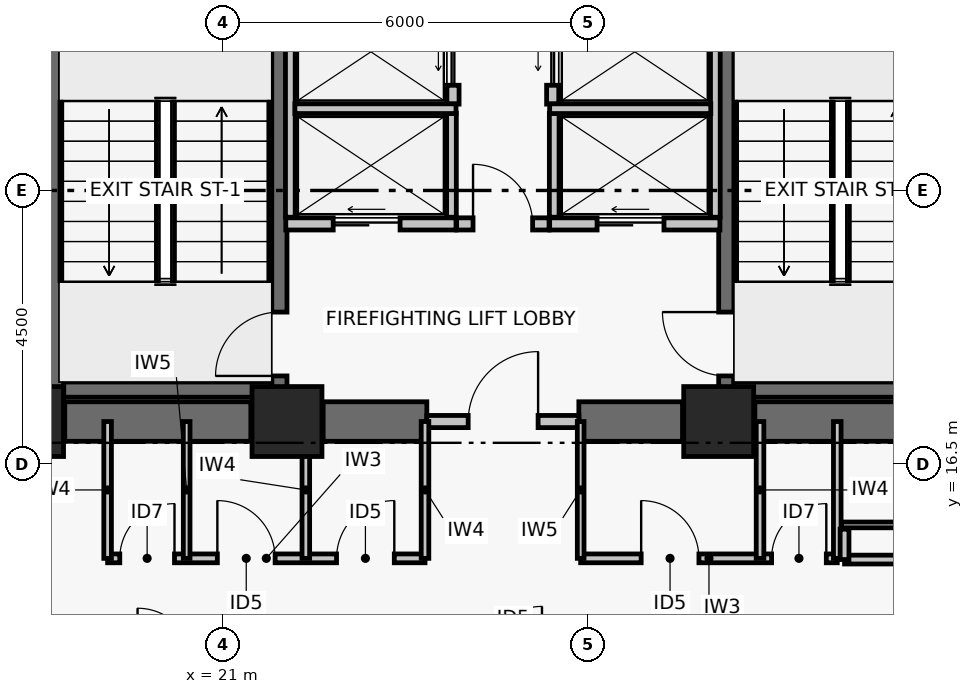
"""IFC4 building model, lengths in metres.
Left out: names, types, materials, properties, quantities, classifications, styles, units other than length and angle.
Written with IfcOpenShell. Run it as: python <this file> out.ifc"""

import sys

from ifc_helpers import new_model, si_unit, direction, frame, frame_2d, origin, origin_2d, place, context, subcontext, project, spatial, rectangle, extrude, element, fill, save


model = new_model("IFC4")
c1 = context("Model", 3, precision=1e-05, world=origin(), true_north=direction((0.0, 1.0)))
c2 = subcontext(c1, "Body", "Model", "MODEL_VIEW")
j1 = project(units=[si_unit("LENGTHUNIT", "METRE"), si_unit("PLANEANGLEUNIT", "RADIAN")], contexts=[c1])
p1 = place(None, origin())
s1 = spatial("IfcSite", under=j1, at=p1, CompositionType="ELEMENT")
p2 = place(p1, origin())
s2 = spatial("IfcBuilding", under=s1, at=p2, CompositionType="ELEMENT")
p3 = place(p2, frame((0.0, 0.0, 12.0)))
s3 = spatial("IfcBuildingStorey", under=s2, at=p3, CompositionType="ELEMENT", Elevation=12.0)
for number, where, z_axis, x_axis in (
    (1, (17.8, 17.2, 0.0), (0.0, 0.0, 1.0), (1.0, 0.0, 0.0)),
    (2, (22.05, 17.2, 0.0), (0.0, 0.0, 1.0), (1.0, 0.0, 0.0)),
    (3, (29.15, 17.2, 0.0), (0.0, 0.0, 1.0), (1.0, 0.0, 0.0)),
):
    element("IfcColumn", number, at=place(p3, frame(where, z_axis=z_axis, x_axis=x_axis)), inside=s3, PredefinedType="COLUMN", context=c2, shape_type="SweptSolid", body=[
        extrude(rectangle(XDim=1.15, YDim=1.15, at=origin_2d()), origin(), (0.0, 0.0, 1.0), 6.0),
    ])
p4 = place(p3, frame((18.395, 17.2, 0.0), z_axis=(0.0, 0.0, 1.0), x_axis=(1.0, 0.0, 0.0)))
e4 = element("IfcWall", 4, at=p4, inside=s3, PredefinedType="SHEAR", context=c2, shape_type="SweptSolid", body=[
    extrude(rectangle(XDim=3.06, YDim=0.65, at=frame_2d((1.53, 0.0))), origin(), (0.0, 0.0, 1.0), 5.68),
])
p5 = place(p3, frame((22.645, 17.2, 0.0), z_axis=(0.0, 0.0, 1.0), x_axis=(1.0, 0.0, 0.0)))
e5 = element("IfcWall", 5, at=p5, inside=s3, PredefinedType="SHEAR", context=c2, shape_type="SweptSolid", body=[
    extrude(rectangle(XDim=1.705, YDim=0.65, at=frame_2d((0.853, 0.0))), origin(), (0.0, 0.0, 1.0), 5.68),
])
p6 = place(p3, frame((26.85, 17.2, 0.0), z_axis=(0.0, 0.0, 1.0), x_axis=(1.0, 0.0, 0.0)))
e6 = element("IfcWall", 6, at=p6, inside=s3, PredefinedType="SHEAR", context=c2, shape_type="SweptSolid", body=[
    extrude(rectangle(XDim=1.705, YDim=0.65, at=frame_2d((0.853, 0.0))), origin(), (0.0, 0.0, 1.0), 5.68),
])
p7 = place(p3, frame((29.745, 17.2, 0.0), z_axis=(0.0, 0.0, 1.0), x_axis=(1.0, 0.0, 0.0)))
e7 = element("IfcWall", 7, at=p7, inside=s3, PredefinedType="SHEAR", context=c2, shape_type="SweptSolid", body=[
    extrude(rectangle(XDim=3.06, YDim=0.65, at=frame_2d((1.53, 0.0))), origin(), (0.0, 0.0, 1.0), 5.68),
])
p8 = place(p3, frame((18.254, 17.6, 0.0), z_axis=(0.0, 0.0, 1.0), x_axis=(0.0, 1.0, 0.0)))
e8 = element("IfcWall", 8, at=p8, inside=s3, PredefinedType="SHEAR", context=c2, shape_type="SweptSolid", body=[
    extrude(rectangle(XDim=8.8, YDim=0.25, at=frame_2d((4.4, 0.0))), origin(), (0.0, 0.0, 1.0), 5.68),
])
p9 = place(p3, frame((21.925, 17.6, 0.0), z_axis=(0.0, 0.0, 1.0), x_axis=(0.0, 1.0, 0.0)))
e9 = element("IfcWall", 9, at=p9, inside=s3, PredefinedType="SHEAR", context=c2, shape_type="SweptSolid", body=[
    extrude(rectangle(XDim=8.8, YDim=0.25, at=frame_2d((4.4, 0.0))), origin(), (0.0, 0.0, 1.0), 5.68),
])
p10 = place(p9, frame((0.35, 0.0, 0.0)))
e10 = element("IfcOpeningElement", 10, at=p10, cuts=e9, PredefinedType="OPENING", context=c2, shape_type="SweptSolid", body=[
    extrude(rectangle(XDim=1.05, YDim=2.08, at=frame_2d((0.525, 1.04))), frame((0.0, 0.135, 0.0), z_axis=(0.0, -1.0, 0.0), x_axis=(1.0, 0.0, 0.0)), (0.0, 0.0, 1.0), 0.27),
])
p11 = place(p3, frame((18.379, 17.725, 0.0), z_axis=(0.0, 0.0, 1.0), x_axis=(1.0, 0.0, 0.0)))
e11 = element("IfcWall", 11, at=p11, inside=s3, PredefinedType="SHEAR", context=c2, shape_type="SweptSolid", body=[
    extrude(rectangle(XDim=3.421, YDim=0.25, at=frame_2d((1.71, 0.0))), origin(), (0.0, 0.0, 1.0), 5.68),
])
p12 = place(p3, frame((29.275, 17.6, 0.0), z_axis=(0.0, 0.0, 1.0), x_axis=(0.0, 1.0, 0.0)))
e12 = element("IfcWall", 12, at=p12, inside=s3, PredefinedType="SHEAR", context=c2, shape_type="SweptSolid", body=[
    extrude(rectangle(XDim=8.8, YDim=0.25, at=frame_2d((4.4, 0.0))), origin(), (0.0, 0.0, 1.0), 5.68),
])
p13 = place(p12, frame((0.35, 0.0, 0.0)))
e13 = element("IfcOpeningElement", 13, at=p13, cuts=e12, PredefinedType="OPENING", context=c2, shape_type="SweptSolid", body=[
    extrude(rectangle(XDim=1.05, YDim=2.08, at=frame_2d((0.525, 1.04))), frame((0.0, 0.135, 0.0), z_axis=(0.0, -1.0, 0.0), x_axis=(1.0, 0.0, 0.0)), (0.0, 0.0, 1.0), 0.27),
])
p14 = place(p3, frame((29.4, 17.725, 0.0), z_axis=(0.0, 0.0, 1.0), x_axis=(1.0, 0.0, 0.0)))
e14 = element("IfcWall", 14, at=p14, inside=s3, PredefinedType="SHEAR", context=c2, shape_type="SweptSolid", body=[
    extrude(rectangle(XDim=3.421, YDim=0.25, at=frame_2d((1.71, 0.0))), origin(), (0.0, 0.0, 1.0), 5.68),
])
p15 = place(p3, frame((24.35, 17.2, 0.0), z_axis=(0.0, 0.0, 1.0), x_axis=(1.0, 0.0, 0.0)))
e15 = element("IfcWall", 15, at=p15, inside=s3, PredefinedType="PARTITIONING", context=c2, shape_type="SweptSolid", body=[
    extrude(rectangle(XDim=2.5, YDim=0.2, at=frame_2d((1.25, 0.0))), origin(), (0.0, 0.0, 1.0), 4.81),
])
p16 = place(p15, frame((0.68, 0.0, 0.0)))
e16 = element("IfcOpeningElement", 16, at=p16, cuts=e15, PredefinedType="OPENING", context=c2, shape_type="SweptSolid", body=[
    extrude(rectangle(XDim=1.15, YDim=2.08, at=frame_2d((0.575, 1.04))), frame((0.0, 0.11, 0.0), z_axis=(0.0, -1.0, 0.0), x_axis=(1.0, 0.0, 0.0)), (0.0, 0.0, 1.0), 0.22),
])
p17 = place(p3, frame((24.84, 20.45, 0.0), z_axis=(0.0, 0.0, 1.0), x_axis=(1.0, 0.0, 0.0)))
e17 = element("IfcWall", 17, at=p17, inside=s3, PredefinedType="PARTITIONING", context=c2, shape_type="SweptSolid", body=[
    extrude(rectangle(XDim=1.52, YDim=0.2, at=frame_2d((0.76, 0.0))), origin(), (0.0, 0.0, 1.0), 5.68),
])
p18 = place(p17, frame((0.27, 0.0, 0.0)))
e18 = element("IfcOpeningElement", 18, at=p18, cuts=e17, PredefinedType="OPENING", context=c2, shape_type="SweptSolid", body=[
    extrude(rectangle(XDim=0.98, YDim=2.06, at=frame_2d((0.49, 1.03))), frame((0.0, 0.11, 0.0), z_axis=(0.0, -1.0, 0.0), x_axis=(1.0, 0.0, 0.0)), (0.0, 0.0, 1.0), 0.22),
])
p19 = place(p3, frame((22.03, 20.45, 0.0), z_axis=(0.0, 0.0, 1.0), x_axis=(1.0, 0.0, 0.0)))
e19 = element("IfcWall", 19, at=p19, inside=s3, PredefinedType="PARTITIONING", context=c2, shape_type="SweptSolid", body=[
    extrude(rectangle(XDim=2.8, YDim=0.2, at=frame_2d((1.4, 0.0))), origin(), (0.0, 0.0, 1.0), 5.68),
])
p20 = place(p19, frame((0.78, 0.0, 0.0)))
e20 = element("IfcOpeningElement", 20, at=p20, cuts=e19, PredefinedType="OPENING", context=c2, shape_type="SweptSolid", body=[
    extrude(rectangle(XDim=1.1, YDim=2.08, at=frame_2d((0.55, 1.04))), frame((0.0, 0.11, 0.0), z_axis=(0.0, -1.0, 0.0), x_axis=(1.0, 0.0, 0.0)), (0.0, 0.0, 1.0), 0.22),
])
p21 = place(p3, frame((26.37, 20.45, 0.0), z_axis=(0.0, 0.0, 1.0), x_axis=(1.0, 0.0, 0.0)))
e21 = element("IfcWall", 21, at=p21, inside=s3, PredefinedType="PARTITIONING", context=c2, shape_type="SweptSolid", body=[
    extrude(rectangle(XDim=2.8, YDim=0.2, at=frame_2d((1.4, 0.0))), origin(), (0.0, 0.0, 1.0), 5.68),
])
p22 = place(p21, frame((0.78, 0.0, 0.0)))
e22 = element("IfcOpeningElement", 22, at=p22, cuts=e21, PredefinedType="OPENING", context=c2, shape_type="SweptSolid", body=[
    extrude(rectangle(XDim=1.1, YDim=2.08, at=frame_2d((0.55, 1.04))), frame((0.0, 0.11, 0.0), z_axis=(0.0, -1.0, 0.0), x_axis=(1.0, 0.0, 0.0)), (0.0, 0.0, 1.0), 0.22),
])
p23 = place(p3, frame((24.78, 22.42, 0.0), z_axis=(0.0, 0.0, 1.0), x_axis=(0.0, 1.0, 0.0)))
e23 = element("IfcWall", 23, at=p23, inside=s3, PredefinedType="PARTITIONING", context=c2, shape_type="SweptSolid", body=[
    extrude(rectangle(XDim=1.72, YDim=0.2, at=frame_2d((0.86, 0.0))), origin(), (0.0, 0.0, 1.0), 5.68),
])
p24 = place(p23, frame((0.31, 0.0, 0.0)))
e24 = element("IfcOpeningElement", 24, at=p24, cuts=e23, PredefinedType="OPENING", context=c2, shape_type="SweptSolid", body=[
    extrude(rectangle(XDim=1.1, YDim=2.08, at=frame_2d((0.55, 1.04))), frame((0.0, 0.11, 0.0), z_axis=(0.0, -1.0, 0.0), x_axis=(1.0, 0.0, 0.0)), (0.0, 0.0, 1.0), 0.22),
])
p25 = place(p3, frame((26.42, 22.42, 0.0), z_axis=(0.0, 0.0, 1.0), x_axis=(0.0, 1.0, 0.0)))
e25 = element("IfcWall", 25, at=p25, inside=s3, PredefinedType="PARTITIONING", context=c2, shape_type="SweptSolid", body=[
    extrude(rectangle(XDim=1.72, YDim=0.2, at=frame_2d((0.86, 0.0))), origin(), (0.0, 0.0, 1.0), 5.68),
])
p26 = place(p25, frame((0.31, 0.0, 0.0)))
e26 = element("IfcOpeningElement", 26, at=p26, cuts=e25, PredefinedType="OPENING", context=c2, shape_type="SweptSolid", body=[
    extrude(rectangle(XDim=1.1, YDim=2.08, at=frame_2d((0.55, 1.04))), frame((0.0, 0.11, 0.0), z_axis=(0.0, -1.0, 0.0), x_axis=(1.0, 0.0, 0.0)), (0.0, 0.0, 1.0), 0.22),
])
p27 = place(p3, frame((22.105, 20.56, 0.0), z_axis=(0.0, 0.0, 1.0), x_axis=(0.0, 1.0, 0.0)))
e27 = element("IfcWall", 27, at=p27, inside=s3, PredefinedType="PARTITIONING", context=c2, shape_type="SweptSolid", body=[
    extrude(rectangle(XDim=5.45, YDim=0.16, at=frame_2d((2.725, 0.0))), origin(), (0.0, 0.0, 1.0), 5.68),
])
p28 = place(p3, frame((24.755, 20.56, 0.0), z_axis=(0.0, 0.0, 1.0), x_axis=(0.0, 1.0, 0.0)))
e28 = element("IfcWall", 28, at=p28, inside=s3, PredefinedType="PARTITIONING", context=c2, shape_type="SweptSolid", body=[
    extrude(rectangle(XDim=1.71, YDim=0.16, at=frame_2d((0.855, 0.0))), origin(), (0.0, 0.0, 1.0), 5.68),
])
p29 = place(p3, frame((22.18, 22.345, 0.0), z_axis=(0.0, 0.0, 1.0), x_axis=(1.0, 0.0, 0.0)))
e29 = element("IfcWall", 29, at=p29, inside=s3, PredefinedType="PARTITIONING", context=c2, shape_type="SweptSolid", body=[
    extrude(rectangle(XDim=2.65, YDim=0.16, at=frame_2d((1.325, 0.0))), origin(), (0.0, 0.0, 1.0), 5.68),
])
p30 = place(p3, frame((29.095, 20.56, 0.0), z_axis=(0.0, 0.0, 1.0), x_axis=(0.0, 1.0, 0.0)))
e30 = element("IfcWall", 30, at=p30, inside=s3, PredefinedType="PARTITIONING", context=c2, shape_type="SweptSolid", body=[
    extrude(rectangle(XDim=5.45, YDim=0.16, at=frame_2d((2.725, 0.0))), origin(), (0.0, 0.0, 1.0), 5.68),
])
p31 = place(p3, frame((26.445, 20.56, 0.0), z_axis=(0.0, 0.0, 1.0), x_axis=(0.0, 1.0, 0.0)))
e31 = element("IfcWall", 31, at=p31, inside=s3, PredefinedType="PARTITIONING", context=c2, shape_type="SweptSolid", body=[
    extrude(rectangle(XDim=1.71, YDim=0.16, at=frame_2d((0.855, 0.0))), origin(), (0.0, 0.0, 1.0), 5.68),
])
p32 = place(p3, frame((26.37, 22.345, 0.0), z_axis=(0.0, 0.0, 1.0), x_axis=(1.0, 0.0, 0.0)))
e32 = element("IfcWall", 32, at=p32, inside=s3, PredefinedType="PARTITIONING", context=c2, shape_type="SweptSolid", body=[
    extrude(rectangle(XDim=2.65, YDim=0.16, at=frame_2d((1.325, 0.0))), origin(), (0.0, 0.0, 1.0), 5.68),
])
p33 = place(p3, frame((19.1, 14.95, 0.0), z_axis=(0.0, 0.0, 1.0), x_axis=(1.0, 0.0, 0.0)))
e33 = element("IfcWall", 33, at=p33, inside=s3, PredefinedType="PARTITIONING", context=c2, shape_type="SweptSolid", body=[
    extrude(rectangle(XDim=5.22, YDim=0.145, at=frame_2d((2.61, 0.0))), origin(), (0.0, 0.0, 1.0), 4.76),
])
p34 = place(p33, frame((0.2, 0.0, 0.0)))
e34 = element("IfcOpeningElement", 34, at=p34, cuts=e33, PredefinedType="OPENING", context=c2, shape_type="SweptSolid", body=[
    extrude(rectangle(XDim=0.9, YDim=2.02, at=frame_2d((0.45, 1.01))), frame((0.0, 0.083, 0.0), z_axis=(0.0, -1.0, 0.0), x_axis=(1.0, 0.0, 0.0)), (0.0, 0.0, 1.0), 0.165),
])
p35 = place(p33, frame((1.805, 0.0, 0.0)))
e35 = element("IfcOpeningElement", 35, at=p35, cuts=e33, PredefinedType="OPENING", context=c2, shape_type="SweptSolid", body=[
    extrude(rectangle(XDim=0.95, YDim=2.06, at=frame_2d((0.475, 1.03))), frame((0.0, 0.083, 0.0), z_axis=(0.0, -1.0, 0.0), x_axis=(1.0, 0.0, 0.0)), (0.0, 0.0, 1.0), 0.165),
])
p36 = place(p33, frame((3.765, 0.0, 0.0)))
e36 = element("IfcOpeningElement", 36, at=p36, cuts=e33, PredefinedType="OPENING", context=c2, shape_type="SweptSolid", body=[
    extrude(rectangle(XDim=0.95, YDim=2.06, at=frame_2d((0.475, 1.03))), frame((0.0, 0.083, 0.0), z_axis=(0.0, -1.0, 0.0), x_axis=(1.0, 0.0, 0.0)), (0.0, 0.0, 1.0), 0.165),
])
p37 = place(p3, frame((26.88, 14.95, 0.0), z_axis=(0.0, 0.0, 1.0), x_axis=(1.0, 0.0, 0.0)))
e37 = element("IfcWall", 37, at=p37, inside=s3, PredefinedType="PARTITIONING", context=c2, shape_type="SweptSolid", body=[
    extrude(rectangle(XDim=4.22, YDim=0.145, at=frame_2d((2.11, 0.0))), origin(), (0.0, 0.0, 1.0), 5.21),
])
p38 = place(p37, frame((0.995, 0.0, 0.0)))
e38 = element("IfcOpeningElement", 38, at=p38, cuts=e37, PredefinedType="OPENING", context=c2, shape_type="SweptSolid", body=[
    extrude(rectangle(XDim=0.95, YDim=2.06, at=frame_2d((0.475, 1.03))), frame((0.0, 0.083, 0.0), z_axis=(0.0, -1.0, 0.0), x_axis=(1.0, 0.0, 0.0)), (0.0, 0.0, 1.0), 0.165),
])
p39 = place(p37, frame((3.14, 0.0, 0.0)))
e39 = element("IfcOpeningElement", 39, at=p39, cuts=e37, PredefinedType="OPENING", context=c2, shape_type="SweptSolid", body=[
    extrude(rectangle(XDim=0.9, YDim=2.02, at=frame_2d((0.45, 1.01))), frame((0.0, 0.083, 0.0), z_axis=(0.0, -1.0, 0.0), x_axis=(1.0, 0.0, 0.0)), (0.0, 0.0, 1.0), 0.165),
])
p40 = place(p3, frame((19.1, 14.95, 0.0), z_axis=(0.0, 0.0, 1.0), x_axis=(0.0, 1.0, 0.0)))
e40 = element("IfcWall", 40, at=p40, inside=s3, PredefinedType="PARTITIONING", context=c2, shape_type="SweptSolid", body=[
    extrude(rectangle(XDim=2.25, YDim=0.125, at=frame_2d((1.125, 0.0))), origin(), (0.0, 0.0, 1.0), 4.81),
])
p41 = place(p3, frame((20.4, 14.95, 0.0), z_axis=(0.0, 0.0, 1.0), x_axis=(0.0, 1.0, 0.0)))
e41 = element("IfcWall", 41, at=p41, inside=s3, PredefinedType="PARTITIONING", context=c2, shape_type="SweptSolid", body=[
    extrude(rectangle(XDim=2.25, YDim=0.11, at=frame_2d((1.125, 0.0))), origin(), (0.0, 0.0, 1.0), 4.81),
])
p42 = place(p3, frame((22.36, 14.95, 0.0), z_axis=(0.0, 0.0, 1.0), x_axis=(0.0, 1.0, 0.0)))
e42 = element("IfcWall", 42, at=p42, inside=s3, PredefinedType="PARTITIONING", context=c2, shape_type="SweptSolid", body=[
    extrude(rectangle(XDim=2.25, YDim=0.125, at=frame_2d((1.125, 0.0))), origin(), (0.0, 0.0, 1.0), 4.76),
])
p43 = place(p3, frame((24.32, 14.95, 0.0), z_axis=(0.0, 0.0, 1.0), x_axis=(0.0, 1.0, 0.0)))
e43 = element("IfcWall", 43, at=p43, inside=s3, PredefinedType="PARTITIONING", context=c2, shape_type="SweptSolid", body=[
    extrude(rectangle(XDim=2.25, YDim=0.125, at=frame_2d((1.125, 0.0))), origin(), (0.0, 0.0, 1.0), 4.81),
])
p44 = place(p3, frame((26.88, 14.95, 0.0), z_axis=(0.0, 0.0, 1.0), x_axis=(0.0, 1.0, 0.0)))
e44 = element("IfcWall", 44, at=p44, inside=s3, PredefinedType="PARTITIONING", context=c2, shape_type="SweptSolid", body=[
    extrude(rectangle(XDim=2.25, YDim=0.11, at=frame_2d((1.125, 0.0))), origin(), (0.0, 0.0, 1.0), 4.81),
])
for number, where, z_axis, x_axis in (
    (45, (29.83, 14.95, 0.0), (0.0, 0.0, 1.0), (0.0, 1.0, 0.0)),
    (46, (31.1, 14.95, 0.0), (0.0, 0.0, 1.0), (0.0, 1.0, 0.0)),
):
    element("IfcWall", number, at=place(p3, frame(where, z_axis=z_axis, x_axis=x_axis)), inside=s3, PredefinedType="PARTITIONING", context=c2, shape_type="SweptSolid", body=[
        extrude(rectangle(XDim=2.25, YDim=0.125, at=frame_2d((1.125, 0.0))), origin(), (0.0, 0.0, 1.0), 4.81),
    ])
p45 = place(p3, frame((32.8, 14.93, 0.0), z_axis=(0.0, 0.0, 1.0), x_axis=(-1.0, 0.0, 0.0)))
e47 = element("IfcWall", 47, at=p45, inside=s3, PredefinedType="PARTITIONING", context=c2, shape_type="SweptSolid", body=[
    extrude(rectangle(XDim=1.58, YDim=0.145, at=frame_2d((0.79, 0.0))), origin(), (0.0, 0.0, 1.0), 5.21),
])
p46 = place(p3, frame((31.22, 14.93, 0.0), z_axis=(0.0, 0.0, 1.0), x_axis=(0.0, 1.0, 0.0)))
e48 = element("IfcWall", 48, at=p46, inside=s3, PredefinedType="PARTITIONING", context=c2, shape_type="SweptSolid", body=[
    extrude(rectangle(XDim=0.5, YDim=0.145, at=frame_2d((0.25, 0.0))), origin(), (0.0, 0.0, 1.0), 5.21),
])
p47 = place(p3, frame((31.17, 15.5, 0.0), z_axis=(0.0, 0.0, 1.0), x_axis=(1.0, 0.0, 0.0)))
e49 = element("IfcWall", 49, at=p47, inside=s3, PredefinedType="PARTITIONING", context=c2, shape_type="SweptSolid", body=[
    extrude(rectangle(XDim=8.689, YDim=0.095, at=frame_2d((4.345, 0.0))), origin(), (0.0, 0.0, 1.0), 4.76),
])
p48 = place(p47, frame((2.983, 0.0, 0.0)))
e50 = element("IfcOpeningElement", 50, at=p48, cuts=e49, PredefinedType="OPENING", context=c2, shape_type="SweptSolid", body=[
    extrude(rectangle(XDim=0.92, YDim=2.05, at=frame_2d((0.46, 1.025))), frame((0.0, 0.057, 0.0), z_axis=(0.0, -1.0, 0.0), x_axis=(1.0, 0.0, 0.0)), (0.0, 0.0, 1.0), 0.115),
])
p49 = place(p10, origin())
e51 = element("IfcDoor", 51, at=p49, inside=s3, OperationType="SINGLE_SWING_LEFT", PredefinedType="DOOR", context=c2, shape_type="SweptSolid", body=[
    extrude(rectangle(XDim=1.05, YDim=2.08, at=frame_2d((0.525, 1.04))), frame((0.0, 0.025, 0.0), z_axis=(0.0, -1.0, 0.0), x_axis=(1.0, 0.0, 0.0)), (0.0, 0.0, 1.0), 0.05),
])
fill(e10, e51)
p50 = place(p13, origin())
e52 = element("IfcDoor", 52, at=p50, inside=s3, OperationType="SINGLE_SWING_RIGHT", PredefinedType="DOOR", context=c2, shape_type="SweptSolid", body=[
    extrude(rectangle(XDim=1.05, YDim=2.08, at=frame_2d((0.525, 1.04))), frame((0.0, 0.025, 0.0), z_axis=(0.0, -1.0, 0.0), x_axis=(1.0, 0.0, 0.0)), (0.0, 0.0, 1.0), 0.05),
])
fill(e13, e52)
p51 = place(p16, origin())
e53 = element("IfcDoor", 53, at=p51, inside=s3, OperationType="SINGLE_SWING_RIGHT", PredefinedType="DOOR", context=c2, shape_type="SweptSolid", body=[
    extrude(rectangle(XDim=1.15, YDim=2.08, at=frame_2d((0.575, 1.04))), frame((0.0, 0.025, 0.0), z_axis=(0.0, -1.0, 0.0), x_axis=(1.0, 0.0, 0.0)), (0.0, 0.0, 1.0), 0.05),
])
fill(e16, e53)
p52 = place(p18, origin())
e54 = element("IfcDoor", 54, at=p52, inside=s3, OperationType="SINGLE_SWING_LEFT", PredefinedType="DOOR", context=c2, shape_type="SweptSolid", body=[
    extrude(rectangle(XDim=0.98, YDim=2.06, at=frame_2d((0.49, 1.03))), frame((0.0, 0.025, 0.0), z_axis=(0.0, -1.0, 0.0), x_axis=(1.0, 0.0, 0.0)), (0.0, 0.0, 1.0), 0.05),
])
fill(e18, e54)
p53 = place(p20, origin())
e55 = element("IfcDoor", 55, at=p53, inside=s3, OperationType="DOUBLE_DOOR_SLIDING", PredefinedType="DOOR", context=c2, shape_type="SweptSolid", body=[
    extrude(rectangle(XDim=1.1, YDim=2.08, at=frame_2d((0.55, 1.04))), frame((0.0, 0.025, 0.0), z_axis=(0.0, -1.0, 0.0), x_axis=(1.0, 0.0, 0.0)), (0.0, 0.0, 1.0), 0.05),
])
fill(e20, e55)
p54 = place(p22, origin())
e56 = element("IfcDoor", 56, at=p54, inside=s3, OperationType="DOUBLE_DOOR_SLIDING", PredefinedType="DOOR", context=c2, shape_type="SweptSolid", body=[
    extrude(rectangle(XDim=1.1, YDim=2.08, at=frame_2d((0.55, 1.04))), frame((0.0, 0.025, 0.0), z_axis=(0.0, -1.0, 0.0), x_axis=(1.0, 0.0, 0.0)), (0.0, 0.0, 1.0), 0.05),
])
fill(e22, e56)
p55 = place(p24, origin())
e57 = element("IfcDoor", 57, at=p55, inside=s3, OperationType="DOUBLE_DOOR_SLIDING", PredefinedType="DOOR", context=c2, shape_type="SweptSolid", body=[
    extrude(rectangle(XDim=1.1, YDim=2.08, at=frame_2d((0.55, 1.04))), frame((0.0, 0.025, 0.0), z_axis=(0.0, -1.0, 0.0), x_axis=(1.0, 0.0, 0.0)), (0.0, 0.0, 1.0), 0.05),
])
fill(e24, e57)
p56 = place(p26, origin())
e58 = element("IfcDoor", 58, at=p56, inside=s3, OperationType="DOUBLE_DOOR_SLIDING", PredefinedType="DOOR", context=c2, shape_type="SweptSolid", body=[
    extrude(rectangle(XDim=1.1, YDim=2.08, at=frame_2d((0.55, 1.04))), frame((0.0, 0.025, 0.0), z_axis=(0.0, -1.0, 0.0), x_axis=(1.0, 0.0, 0.0)), (0.0, 0.0, 1.0), 0.05),
])
fill(e26, e58)
p57 = place(p34, origin())
e59 = element("IfcDoor", 59, at=p57, inside=s3, OperationType="SINGLE_SWING_RIGHT", PredefinedType="DOOR", context=c2, shape_type="SweptSolid", body=[
    extrude(rectangle(XDim=0.9, YDim=2.02, at=frame_2d((0.45, 1.01))), frame((0.0, 0.025, 0.0), z_axis=(0.0, -1.0, 0.0), x_axis=(1.0, 0.0, 0.0)), (0.0, 0.0, 1.0), 0.05),
])
fill(e34, e59)
p58 = place(p35, origin())
e60 = element("IfcDoor", 60, at=p58, inside=s3, OperationType="SINGLE_SWING_LEFT", PredefinedType="DOOR", context=c2, shape_type="SweptSolid", body=[
    extrude(rectangle(XDim=0.95, YDim=2.06, at=frame_2d((0.475, 1.03))), frame((0.0, 0.025, 0.0), z_axis=(0.0, -1.0, 0.0), x_axis=(1.0, 0.0, 0.0)), (0.0, 0.0, 1.0), 0.05),
])
fill(e35, e60)
p59 = place(p36, origin())
e61 = element("IfcDoor", 61, at=p59, inside=s3, OperationType="SINGLE_SWING_RIGHT", PredefinedType="DOOR", context=c2, shape_type="SweptSolid", body=[
    extrude(rectangle(XDim=0.95, YDim=2.06, at=frame_2d((0.475, 1.03))), frame((0.0, 0.025, 0.0), z_axis=(0.0, -1.0, 0.0), x_axis=(1.0, 0.0, 0.0)), (0.0, 0.0, 1.0), 0.05),
])
fill(e36, e61)
p60 = place(p38, origin())
e62 = element("IfcDoor", 62, at=p60, inside=s3, OperationType="SINGLE_SWING_LEFT", PredefinedType="DOOR", context=c2, shape_type="SweptSolid", body=[
    extrude(rectangle(XDim=0.95, YDim=2.06, at=frame_2d((0.475, 1.03))), frame((0.0, 0.025, 0.0), z_axis=(0.0, -1.0, 0.0), x_axis=(1.0, 0.0, 0.0)), (0.0, 0.0, 1.0), 0.05),
])
fill(e38, e62)
p61 = place(p39, origin())
e63 = element("IfcDoor", 63, at=p61, inside=s3, OperationType="SINGLE_SWING_RIGHT", PredefinedType="DOOR", context=c2, shape_type="SweptSolid", body=[
    extrude(rectangle(XDim=0.9, YDim=2.02, at=frame_2d((0.45, 1.01))), frame((0.0, 0.025, 0.0), z_axis=(0.0, -1.0, 0.0), x_axis=(1.0, 0.0, 0.0)), (0.0, 0.0, 1.0), 0.05),
])
fill(e39, e63)
save(model, sys.argv[1])
